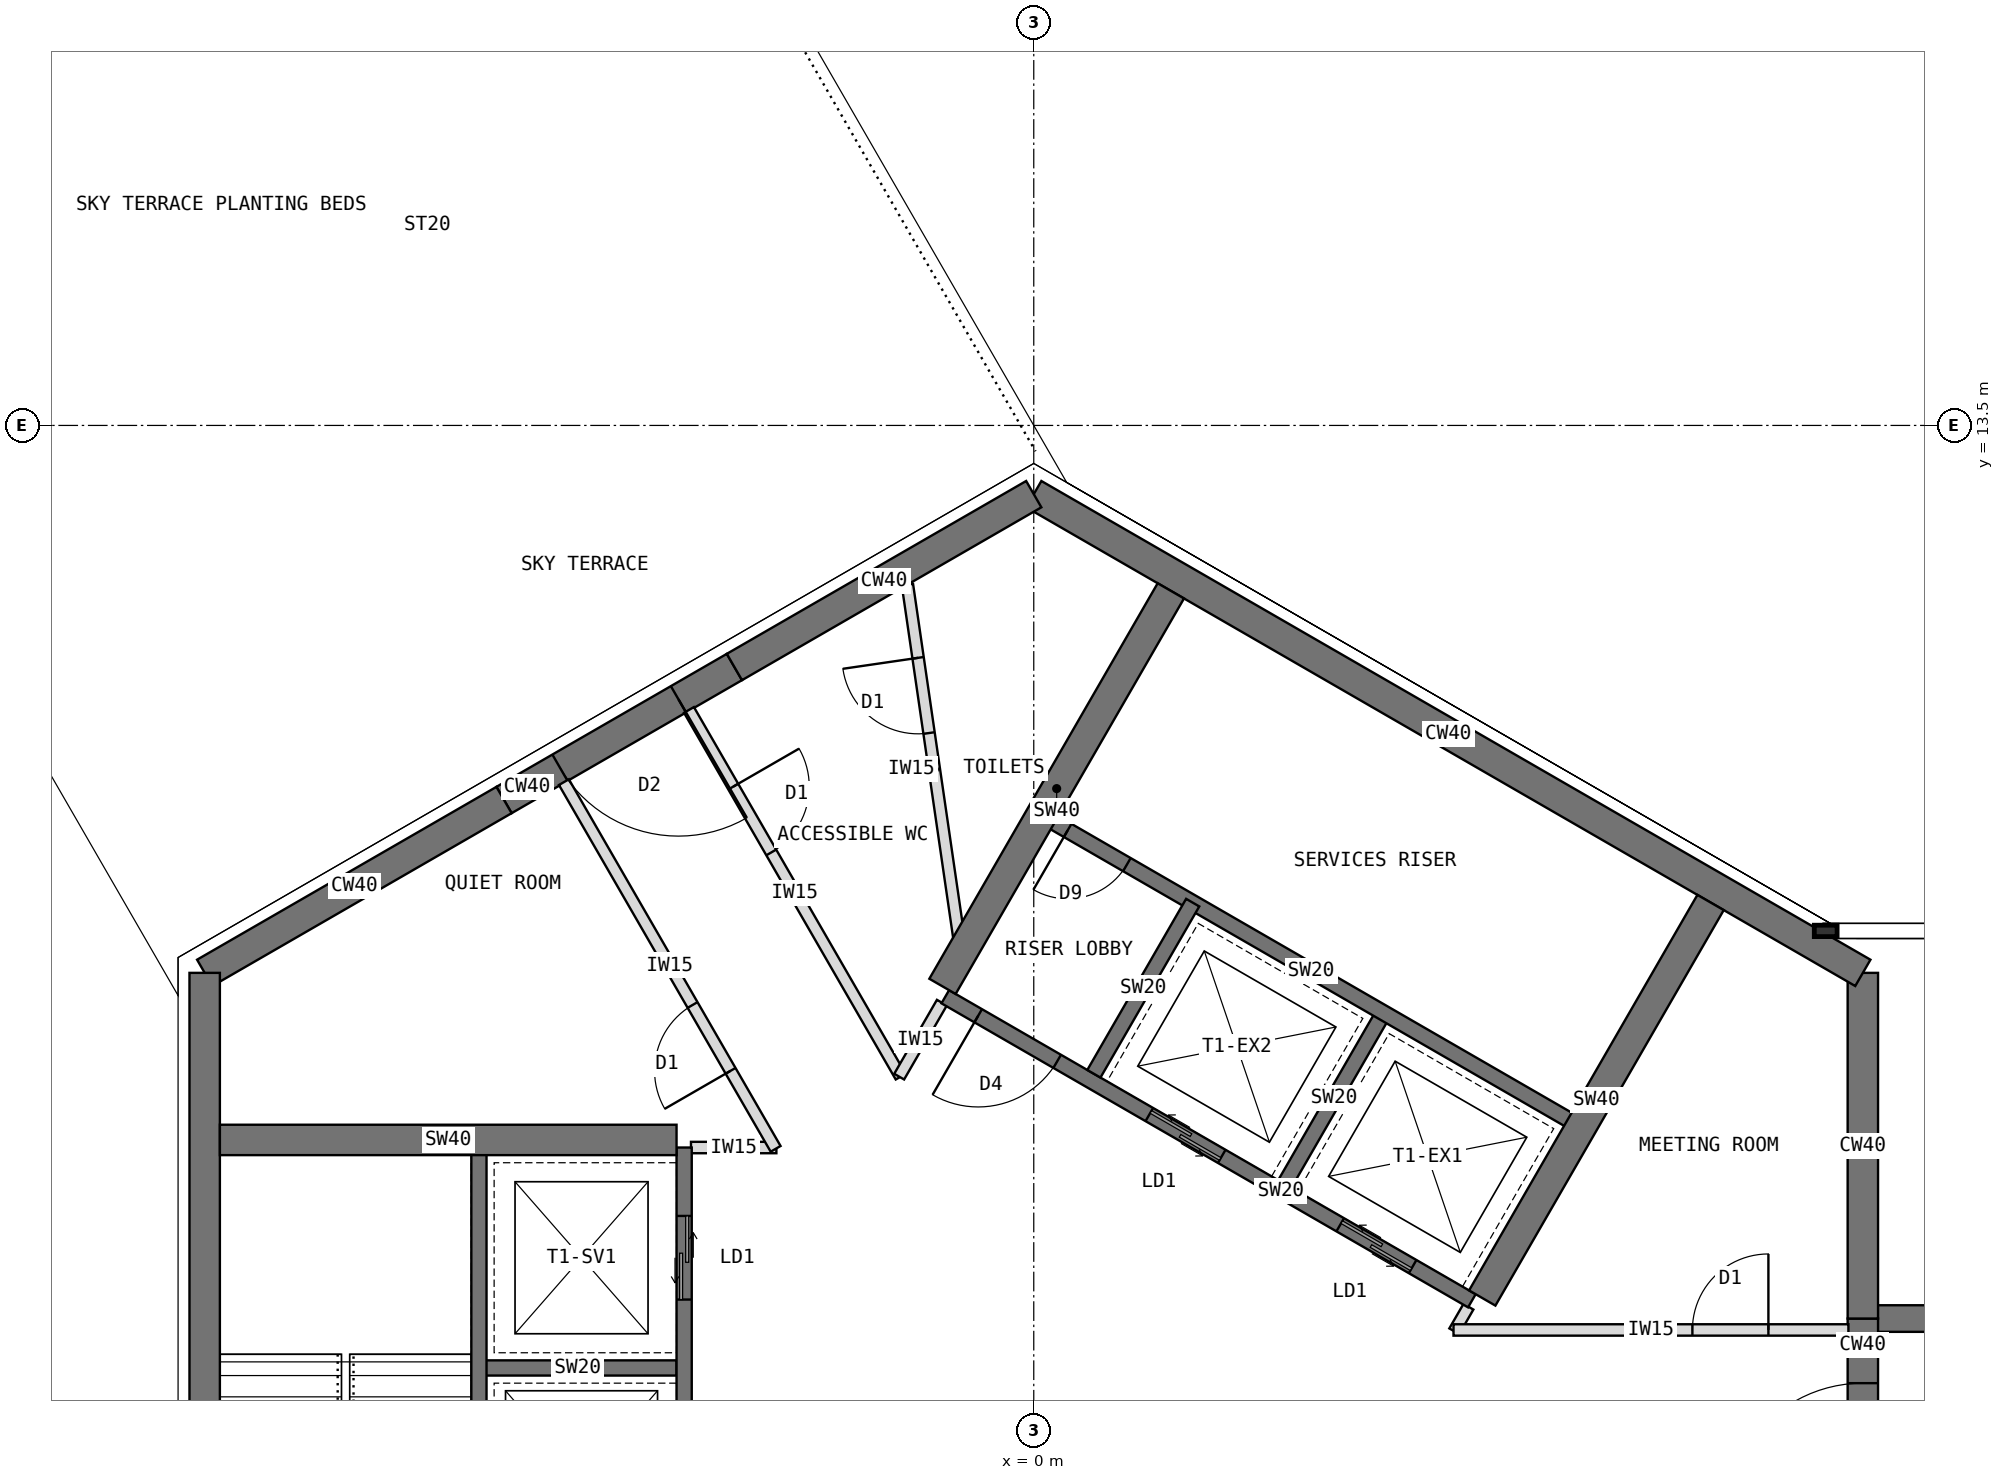
"""IFC4 building model, lengths in metres.
Left out: names, types, materials, properties, quantities, classifications, styles, units other than length and angle.
Written with IfcOpenShell. Run it as: python <this file> out.ifc"""

import sys

from ifc_helpers import new_model, si_unit, direction, frame, frame_2d, origin, place, context, subcontext, project, spatial, rectangle, extrude, element, fill, save


model = new_model("IFC4")
c1 = context("Model", 3, precision=1e-05, world=origin(), true_north=direction((0.0, 1.0)))
c2 = subcontext(c1, "Body", "Model", "MODEL_VIEW")
j1 = project(units=[si_unit("LENGTHUNIT", "METRE"), si_unit("PLANEANGLEUNIT", "RADIAN")], contexts=[c1])
p1 = place(None, origin())
s1 = spatial("IfcSite", under=j1, at=p1, CompositionType="ELEMENT")
p2 = place(p1, origin())
s2 = spatial("IfcBuilding", under=s1, at=p2, CompositionType="ELEMENT")
p3 = place(p2, frame((0.0, 0.0, 243.5)))
s3 = spatial("IfcBuildingStorey", under=s2, at=p3, CompositionType="ELEMENT", Elevation=243.5)
p4 = place(p3, frame((10.908, -1.75, 0.0), z_axis=(0.0, 0.0, 1.0), x_axis=(0.0, 1.0, 0.0)))
e1 = element("IfcWall", 1, at=p4, inside=s3, PredefinedType="SHEAR", context=c2, shape_type="SweptSolid", body=[
    extrude(rectangle(XDim=3.5, YDim=0.4, at=frame_2d((1.75, 0.0))), origin(), (0.0, 0.0, 1.0), 4.0),
])
p5 = place(p4, frame((0.85, 0.0, 0.0)))
e2 = element("IfcOpeningElement", 2, at=p5, cuts=e1, PredefinedType="OPENING", context=c2, shape_type="SweptSolid", body=[
    extrude(rectangle(XDim=1.8, YDim=2.1, at=frame_2d((0.9, 1.05))), frame((0.0, 0.21, 0.0), z_axis=(0.0, -1.0, 0.0), x_axis=(1.0, 0.0, 0.0)), (0.0, 0.0, 1.0), 0.42),
])
p6 = place(p3, frame((10.908, 1.75, 0.0), z_axis=(0.0, 0.0, 1.0), x_axis=(0.0, 1.0, 0.0)))
e3 = element("IfcWall", 3, at=p6, inside=s3, PredefinedType="SHEAR", context=c2, shape_type="SweptSolid", body=[
    extrude(rectangle(XDim=4.548, YDim=0.4, at=frame_2d((2.274, 0.0))), origin(), (0.0, 0.0, 1.0), 4.0),
])
p7 = place(p3, frame((10.908, 6.298, 0.0), z_axis=(0.0, 0.0, 1.0), x_axis=(-0.866021940709, 0.500005998175, 0.0)))
e4 = element("IfcWall", 4, at=p7, inside=s3, PredefinedType="SHEAR", context=c2, shape_type="SweptSolid", body=[
    extrude(rectangle(XDim=12.596, YDim=0.4, at=frame_2d((6.298, 0.0))), origin(), (0.0, 0.0, 1.0), 4.0),
])
p8 = place(p3, frame((0.0, 12.596, 0.0), z_axis=(0.0, 0.0, 1.0), x_axis=(-0.866011268655, -0.500024481964, 0.0)))
e5 = element("IfcWall", 5, at=p8, inside=s3, PredefinedType="SHEAR", context=c2, shape_type="SweptSolid", body=[
    extrude(rectangle(XDim=4.548, YDim=0.4, at=frame_2d((2.274, 0.0))), origin(), (0.0, 0.0, 1.0), 4.0),
])
p9 = place(p3, frame((-3.939, 10.322, 0.0), z_axis=(0.0, 0.0, 1.0), x_axis=(-0.866019471182, -0.500010275428, 0.0)))
e6 = element("IfcWall", 6, at=p9, inside=s3, PredefinedType="SHEAR", context=c2, shape_type="SweptSolid", body=[
    extrude(rectangle(XDim=3.5, YDim=0.4, at=frame_2d((1.75, 0.0))), origin(), (0.0, 0.0, 1.0), 4.0),
])
p10 = place(p9, frame((0.85, 0.0, 0.0)))
e7 = element("IfcOpeningElement", 7, at=p10, cuts=e6, PredefinedType="OPENING", context=c2, shape_type="SweptSolid", body=[
    extrude(rectangle(XDim=1.8, YDim=2.1, at=frame_2d((0.9, 1.05))), frame((0.0, 0.21, 0.0), z_axis=(0.0, -1.0, 0.0), x_axis=(1.0, 0.0, 0.0)), (0.0, 0.0, 1.0), 0.42),
])
p11 = place(p3, frame((-6.97, 8.572, 0.0), z_axis=(0.0, 0.0, 1.0), x_axis=(-0.866034513004, -0.499984222037, 0.0)))
e8 = element("IfcWall", 8, at=p11, inside=s3, PredefinedType="SHEAR", context=c2, shape_type="SweptSolid", body=[
    extrude(rectangle(XDim=4.548, YDim=0.4, at=frame_2d((2.274, 0.0))), origin(), (0.0, 0.0, 1.0), 4.0),
])
p12 = place(p3, frame((-10.908, 6.298, 0.0), z_axis=(0.0, 0.0, 1.0), x_axis=(0.0, -1.0, 0.0)))
e9 = element("IfcWall", 9, at=p12, inside=s3, PredefinedType="SHEAR", context=c2, shape_type="SweptSolid", body=[
    extrude(rectangle(XDim=12.596, YDim=0.4, at=frame_2d((6.298, 0.0))), origin(), (0.0, 0.0, 1.0), 4.0),
])
p13 = place(p3, frame((10.908, 1.75, 0.0), z_axis=(0.0, 0.0, 1.0), x_axis=(1.0, 0.0, 0.0)))
e10 = element("IfcWall", 10, at=p13, inside=s3, PredefinedType="SHEAR", context=c2, shape_type="SweptSolid", body=[
    extrude(rectangle(XDim=2.592, YDim=0.35, at=frame_2d((1.296, 0.0))), origin(), (0.0, 0.0, 1.0), 4.0),
])
p14 = place(p3, frame((5.764, 1.984, 0.0), z_axis=(0.0, 0.0, 1.0), x_axis=(-0.866026010844, 0.49999894854, 0.0)))
e11 = element("IfcWall", 11, at=p14, inside=s3, PredefinedType="SHEAR", context=c2, shape_type="SweptSolid", body=[
    extrude(rectangle(XDim=8.0, YDim=0.2, at=frame_2d((4.0, 0.0))), origin(), (0.0, 0.0, 1.0), 4.0),
])
p15 = place(p14, frame((6.3, 0.0, 0.0)))
e12 = element("IfcOpeningElement", 12, at=p15, cuts=e11, PredefinedType="OPENING", context=c2, shape_type="SweptSolid", body=[
    extrude(rectangle(XDim=1.2, YDim=2.1, at=frame_2d((0.6, 1.05))), frame((0.0, 0.11, 0.0), z_axis=(0.0, -1.0, 0.0), x_axis=(1.0, 0.0, 0.0)), (0.0, 0.0, 1.0), 0.22),
])
p16 = place(p14, frame((0.9, 0.0, 0.0)))
e13 = element("IfcOpeningElement", 13, at=p16, cuts=e11, PredefinedType="OPENING", context=c2, shape_type="SweptSolid", body=[
    extrude(rectangle(XDim=1.1, YDim=2.2, at=frame_2d((0.55, 1.1))), frame((0.0, 0.11, 0.0), z_axis=(0.0, -1.0, 0.0), x_axis=(1.0, 0.0, 0.0)), (0.0, 0.0, 1.0), 0.22),
])
p17 = place(p14, frame((3.8, 0.0, 0.0)))
e14 = element("IfcOpeningElement", 14, at=p17, cuts=e11, PredefinedType="OPENING", context=c2, shape_type="SweptSolid", body=[
    extrude(rectangle(XDim=1.1, YDim=2.2, at=frame_2d((0.55, 1.1))), frame((0.0, 0.11, 0.0), z_axis=(0.0, -1.0, 0.0), x_axis=(1.0, 0.0, 0.0)), (0.0, 0.0, 1.0), 0.22),
])
for number, where, z_axis, x_axis in (
    (15, (3.303, 3.52, 0.0), (0.0, 0.0, 1.0), (0.5, 0.866, 0.0)),
    (16, (0.791, 4.97, 0.0), (0.0, 0.0, 1.0), (0.5, 0.866, 0.0)),
):
    element("IfcWall", number, at=place(p3, frame(where, z_axis=z_axis, x_axis=x_axis)), inside=s3, PredefinedType="SHEAR", context=c2, shape_type="SweptSolid", body=[
        extrude(rectangle(XDim=2.6, YDim=0.2, at=frame_2d((1.3, 0.0))), origin(), (0.0, 0.0, 1.0), 4.0),
    ])
p18 = place(p3, frame((7.114, 4.322, 0.0), z_axis=(0.0, 0.0, 1.0), x_axis=(-0.866026010844, 0.49999894854, 0.0)))
e17 = element("IfcWall", 17, at=p18, inside=s3, PredefinedType="SHEAR", context=c2, shape_type="SweptSolid", body=[
    extrude(rectangle(XDim=8.0, YDim=0.2, at=frame_2d((4.0, 0.0))), origin(), (0.0, 0.0, 1.0), 4.0),
])
p19 = place(p18, frame((6.8, 0.0, 0.0)))
e18 = element("IfcOpeningElement", 18, at=p19, cuts=e17, PredefinedType="OPENING", context=c2, shape_type="SweptSolid", body=[
    extrude(rectangle(XDim=0.9, YDim=2.1, at=frame_2d((0.45, 1.05))), frame((0.0, 0.11, 0.0), z_axis=(0.0, -1.0, 0.0), x_axis=(1.0, 0.0, 0.0)), (0.0, 0.0, 1.0), 0.22),
])
for number, where, z_axis, x_axis in (
    (19, (-1.201, 6.12, 0.0), (0.0, 0.0, 1.0), (0.5, 0.866, 0.0)),
    (20, (5.901, 2.02, 0.0), (0.0, 0.0, 1.0), (0.5, 0.866, 0.0)),
):
    element("IfcWall", number, at=place(p3, frame(where, z_axis=z_axis, x_axis=x_axis)), inside=s3, PredefinedType="SHEAR", context=c2, shape_type="SweptSolid", body=[
        extrude(rectangle(XDim=6.008, YDim=0.4, at=frame_2d((3.004, 0.0))), origin(), (0.0, 0.0, 1.0), 4.0),
    ])
p20 = place(p3, frame((-4.6, 4.0, 0.0), z_axis=(0.0, 0.0, 1.0), x_axis=(0.0, -1.0, 0.0)))
e21 = element("IfcWall", 21, at=p20, inside=s3, PredefinedType="SHEAR", context=c2, shape_type="SweptSolid", body=[
    extrude(rectangle(XDim=8.0, YDim=0.2, at=frame_2d((4.0, 0.0))), origin(), (0.0, 0.0, 1.0), 4.0),
])
p21 = place(p20, frame((6.3, 0.0, 0.0)))
e22 = element("IfcOpeningElement", 22, at=p21, cuts=e21, PredefinedType="OPENING", context=c2, shape_type="SweptSolid", body=[
    extrude(rectangle(XDim=1.2, YDim=2.1, at=frame_2d((0.6, 1.05))), frame((0.0, 0.11, 0.0), z_axis=(0.0, -1.0, 0.0), x_axis=(1.0, 0.0, 0.0)), (0.0, 0.0, 1.0), 0.22),
])
p22 = place(p20, frame((0.9, 0.0, 0.0)))
e23 = element("IfcOpeningElement", 23, at=p22, cuts=e21, PredefinedType="OPENING", context=c2, shape_type="SweptSolid", body=[
    extrude(rectangle(XDim=1.1, YDim=2.2, at=frame_2d((0.55, 1.1))), frame((0.0, 0.11, 0.0), z_axis=(0.0, -1.0, 0.0), x_axis=(1.0, 0.0, 0.0)), (0.0, 0.0, 1.0), 0.22),
])
p23 = place(p3, frame((-4.7, 1.1, 0.0), z_axis=(0.0, 0.0, 1.0), x_axis=(-1.0, 0.0, 0.0)))
e24 = element("IfcWall", 24, at=p23, inside=s3, PredefinedType="SHEAR", context=c2, shape_type="SweptSolid", body=[
    extrude(rectangle(XDim=2.6, YDim=0.2, at=frame_2d((1.3, 0.0))), origin(), (0.0, 0.0, 1.0), 4.0),
])
p24 = place(p3, frame((-7.3, 4.0, 0.0), z_axis=(0.0, 0.0, 1.0), x_axis=(0.0, -1.0, 0.0)))
e25 = element("IfcWall", 25, at=p24, inside=s3, PredefinedType="SHEAR", context=c2, shape_type="SweptSolid", body=[
    extrude(rectangle(XDim=8.0, YDim=0.2, at=frame_2d((4.0, 0.0))), origin(), (0.0, 0.0, 1.0), 4.0),
])
p25 = place(p24, frame((6.7, 0.0, 0.0)))
e26 = element("IfcOpeningElement", 26, at=p25, cuts=e25, PredefinedType="OPENING", context=c2, shape_type="SweptSolid", body=[
    extrude(rectangle(XDim=1.1, YDim=2.1, at=frame_2d((0.55, 1.05))), frame((0.0, 0.11, 0.0), z_axis=(0.0, -1.0, 0.0), x_axis=(1.0, 0.0, 0.0)), (0.0, 0.0, 1.0), 0.22),
])
p26 = place(p3, frame((-4.7, 4.1, 0.0), z_axis=(0.0, 0.0, 1.0), x_axis=(-1.0, 0.0, 0.0)))
e27 = element("IfcWall", 27, at=p26, inside=s3, PredefinedType="SHEAR", context=c2, shape_type="SweptSolid", body=[
    extrude(rectangle(XDim=6.008, YDim=0.4, at=frame_2d((3.004, 0.0))), origin(), (0.0, 0.0, 1.0), 4.0),
])
p27 = place(p3, frame((-4.51, 4.0, 0.0), z_axis=(0.0, 0.0, 1.0), x_axis=(1.0, 0.0, 0.0)))
e28 = element("IfcWall", 28, at=p27, inside=s3, PredefinedType="PARTITIONING", context=c2, shape_type="SweptSolid", body=[
    extrude(rectangle(XDim=1.124, YDim=0.15, at=frame_2d((0.562, 0.0))), origin(), (0.0, 0.0, 1.0), 3.8),
])
p28 = place(p3, frame((-3.396, 3.983, 0.0), z_axis=(0.0, 0.0, 1.0), x_axis=(-0.499980410194, 0.866036713669, 0.0)))
e29 = element("IfcWall", 29, at=p28, inside=s3, PredefinedType="PARTITIONING", context=c2, shape_type="SweptSolid", body=[
    extrude(rectangle(XDim=5.571, YDim=0.15, at=frame_2d((2.786, 0.0))), origin(), (0.0, 0.0, 1.0), 3.8),
])
p29 = place(p28, frame((1.186, 0.0, 0.0)))
e30 = element("IfcOpeningElement", 30, at=p29, cuts=e29, PredefinedType="OPENING", context=c2, shape_type="SweptSolid", body=[
    extrude(rectangle(XDim=1.0, YDim=2.1, at=frame_2d((0.5, 1.05))), frame((0.0, 0.085, 0.0), z_axis=(0.0, -1.0, 0.0), x_axis=(1.0, 0.0, 0.0)), (0.0, 0.0, 1.0), 0.17),
])
p30 = place(p3, frame((-4.536, 9.757, 0.0), z_axis=(0.0, 0.0, 1.0), x_axis=(0.499980410194, -0.866036713669, 0.0)))
e31 = element("IfcWall", 31, at=p30, inside=s3, PredefinedType="PARTITIONING", context=c2, shape_type="SweptSolid", body=[
    extrude(rectangle(XDim=5.571, YDim=0.15, at=frame_2d((2.786, 0.0))), origin(), (0.0, 0.0, 1.0), 3.8),
])
p31 = place(p30, frame((1.165, 0.0, 0.0)))
e32 = element("IfcOpeningElement", 32, at=p31, cuts=e31, PredefinedType="OPENING", context=c2, shape_type="SweptSolid", body=[
    extrude(rectangle(XDim=1.0, YDim=2.1, at=frame_2d((0.5, 1.05))), frame((0.0, 0.085, 0.0), z_axis=(0.0, -1.0, 0.0), x_axis=(1.0, 0.0, 0.0)), (0.0, 0.0, 1.0), 0.17),
])
p32 = place(p3, frame((-1.771, 4.933, 0.0), z_axis=(0.0, 0.0, 1.0), x_axis=(0.500111091428, 0.865961255618, 0.0)))
e33 = element("IfcWall", 33, at=p32, inside=s3, PredefinedType="PARTITIONING", context=c2, shape_type="SweptSolid", body=[
    extrude(rectangle(XDim=1.124, YDim=0.15, at=frame_2d((0.562, 0.0))), origin(), (0.0, 0.0, 1.0), 3.8),
])
p33 = place(p3, frame((5.719, 1.906, 0.0), z_axis=(0.0, 0.0, 1.0), x_axis=(-0.499590185398, -0.866261881104, 0.0)))
e34 = element("IfcWall", 34, at=p33, inside=s3, PredefinedType="PARTITIONING", context=c2, shape_type="SweptSolid", body=[
    extrude(rectangle(XDim=0.373, YDim=0.15, at=frame_2d((0.187, 0.0))), origin(), (0.0, 0.0, 1.0), 3.8),
])
p34 = place(p3, frame((5.523, 1.6, 0.0), z_axis=(0.0, 0.0, 1.0), x_axis=(1.0, 0.0, 0.0)))
e35 = element("IfcWall", 35, at=p34, inside=s3, PredefinedType="PARTITIONING", context=c2, shape_type="SweptSolid", body=[
    extrude(rectangle(XDim=5.196, YDim=0.15, at=frame_2d((2.598, 0.0))), origin(), (0.0, 0.0, 1.0), 3.8),
])
p35 = place(p34, frame((3.143, 0.0, 0.0)))
e36 = element("IfcOpeningElement", 36, at=p35, cuts=e35, PredefinedType="OPENING", context=c2, shape_type="SweptSolid", body=[
    extrude(rectangle(XDim=1.0, YDim=2.1, at=frame_2d((0.5, 1.05))), frame((0.0, 0.085, 0.0), z_axis=(0.0, -1.0, 0.0), x_axis=(1.0, 0.0, 0.0)), (0.0, 0.0, 1.0), 0.17),
])
p36 = place(p3, frame((-0.954, 6.547, 0.0), z_axis=(0.0, 0.0, 1.0), x_axis=(-0.144261243656, 0.989539637194, 0.0)))
e37 = element("IfcWall", 37, at=p36, inside=s3, PredefinedType="PARTITIONING", context=c2, shape_type="SweptSolid", body=[
    extrude(rectangle(XDim=4.909, YDim=0.15, at=frame_2d((2.455, 0.0))), origin(), (0.0, 0.0, 1.0), 3.8),
])
p37 = place(p36, frame((2.937, 0.0, 0.0)))
e38 = element("IfcOpeningElement", 38, at=p37, cuts=e37, PredefinedType="OPENING", context=c2, shape_type="SweptSolid", body=[
    extrude(rectangle(XDim=1.0, YDim=2.1, at=frame_2d((0.5, 1.05))), frame((0.0, 0.085, 0.0), z_axis=(0.0, -1.0, 0.0), x_axis=(1.0, 0.0, 0.0)), (0.0, 0.0, 1.0), 0.17),
])
p38 = place(p15, origin())
e39 = element("IfcDoor", 39, at=p38, inside=s3, OperationType="SINGLE_SWING_RIGHT", PredefinedType="DOOR", context=c2, shape_type="SweptSolid", body=[
    extrude(rectangle(XDim=1.2, YDim=2.1, at=frame_2d((0.6, 1.05))), frame((0.0, 0.025, 0.0), z_axis=(0.0, -1.0, 0.0), x_axis=(1.0, 0.0, 0.0)), (0.0, 0.0, 1.0), 0.05),
])
fill(e12, e39)
p39 = place(p16, origin())
e40 = element("IfcDoor", 40, at=p39, inside=s3, OperationType="DOUBLE_DOOR_SLIDING", PredefinedType="DOOR", context=c2, shape_type="SweptSolid", body=[
    extrude(rectangle(XDim=1.1, YDim=2.2, at=frame_2d((0.55, 1.1))), frame((0.0, 0.025, 0.0), z_axis=(0.0, -1.0, 0.0), x_axis=(1.0, 0.0, 0.0)), (0.0, 0.0, 1.0), 0.05),
])
fill(e13, e40)
p40 = place(p17, origin())
e41 = element("IfcDoor", 41, at=p40, inside=s3, OperationType="DOUBLE_DOOR_SLIDING", PredefinedType="DOOR", context=c2, shape_type="SweptSolid", body=[
    extrude(rectangle(XDim=1.1, YDim=2.2, at=frame_2d((0.55, 1.1))), frame((0.0, 0.025, 0.0), z_axis=(0.0, -1.0, 0.0), x_axis=(1.0, 0.0, 0.0)), (0.0, 0.0, 1.0), 0.05),
])
fill(e14, e41)
p41 = place(p19, origin())
e42 = element("IfcDoor", 42, at=p41, inside=s3, OperationType="SINGLE_SWING_RIGHT", PredefinedType="DOOR", context=c2, shape_type="SweptSolid", body=[
    extrude(rectangle(XDim=0.9, YDim=2.1, at=frame_2d((0.45, 1.05))), frame((0.0, 0.025, 0.0), z_axis=(0.0, -1.0, 0.0), x_axis=(1.0, 0.0, 0.0)), (0.0, 0.0, 1.0), 0.05),
])
fill(e18, e42)
p42 = place(p22, origin())
e43 = element("IfcDoor", 43, at=p42, inside=s3, OperationType="DOUBLE_DOOR_SLIDING", PredefinedType="DOOR", context=c2, shape_type="SweptSolid", body=[
    extrude(rectangle(XDim=1.1, YDim=2.2, at=frame_2d((0.55, 1.1))), frame((0.0, 0.025, 0.0), z_axis=(0.0, -1.0, 0.0), x_axis=(1.0, 0.0, 0.0)), (0.0, 0.0, 1.0), 0.05),
])
fill(e23, e43)
p43 = place(p5, origin())
e44 = element("IfcDoor", 44, at=p43, inside=s3, OperationType="DOUBLE_DOOR_DOUBLE_SWING", PredefinedType="DOOR", context=c2, shape_type="SweptSolid", body=[
    extrude(rectangle(XDim=1.8, YDim=2.1, at=frame_2d((0.9, 1.05))), frame((0.0, 0.025, 0.0), z_axis=(0.0, -1.0, 0.0), x_axis=(1.0, 0.0, 0.0)), (0.0, 0.0, 1.0), 0.05),
])
fill(e2, e44)
p44 = place(p10, origin())
e45 = element("IfcDoor", 45, at=p44, inside=s3, OperationType="DOUBLE_DOOR_DOUBLE_SWING", PredefinedType="DOOR", context=c2, shape_type="SweptSolid", body=[
    extrude(rectangle(XDim=1.8, YDim=2.1, at=frame_2d((0.9, 1.05))), frame((0.0, 0.025, 0.0), z_axis=(0.0, -1.0, 0.0), x_axis=(1.0, 0.0, 0.0)), (0.0, 0.0, 1.0), 0.05),
])
fill(e7, e45)
p45 = place(p35, origin())
e46 = element("IfcDoor", 46, at=p45, inside=s3, OperationType="SINGLE_SWING_RIGHT", PredefinedType="DOOR", context=c2, shape_type="SweptSolid", body=[
    extrude(rectangle(XDim=1.0, YDim=2.1, at=frame_2d((0.5, 1.05))), frame((0.0, 0.025, 0.0), z_axis=(0.0, -1.0, 0.0), x_axis=(1.0, 0.0, 0.0)), (0.0, 0.0, 1.0), 0.05),
])
fill(e36, e46)
p46 = place(p31, origin())
e47 = element("IfcDoor", 47, at=p46, inside=s3, OperationType="SINGLE_SWING_LEFT", PredefinedType="DOOR", context=c2, shape_type="SweptSolid", body=[
    extrude(rectangle(XDim=1.0, YDim=2.1, at=frame_2d((0.5, 1.05))), frame((0.0, 0.025, 0.0), z_axis=(0.0, -1.0, 0.0), x_axis=(1.0, 0.0, 0.0)), (0.0, 0.0, 1.0), 0.05),
])
fill(e32, e47)
p47 = place(p37, origin())
e48 = element("IfcDoor", 48, at=p47, inside=s3, OperationType="SINGLE_SWING_RIGHT", PredefinedType="DOOR", context=c2, shape_type="SweptSolid", body=[
    extrude(rectangle(XDim=1.0, YDim=2.1, at=frame_2d((0.5, 1.05))), frame((0.0, 0.025, 0.0), z_axis=(0.0, -1.0, 0.0), x_axis=(1.0, 0.0, 0.0)), (0.0, 0.0, 1.0), 0.05),
])
fill(e38, e48)
p48 = place(p29, origin())
e49 = element("IfcDoor", 49, at=p48, inside=s3, OperationType="SINGLE_SWING_LEFT", PredefinedType="DOOR", context=c2, shape_type="SweptSolid", body=[
    extrude(rectangle(XDim=1.0, YDim=2.1, at=frame_2d((0.5, 1.05))), frame((0.0, 0.025, 0.0), z_axis=(0.0, -1.0, 0.0), x_axis=(1.0, 0.0, 0.0)), (0.0, 0.0, 1.0), 0.05),
])
fill(e30, e49)
save(model, sys.argv[1])
